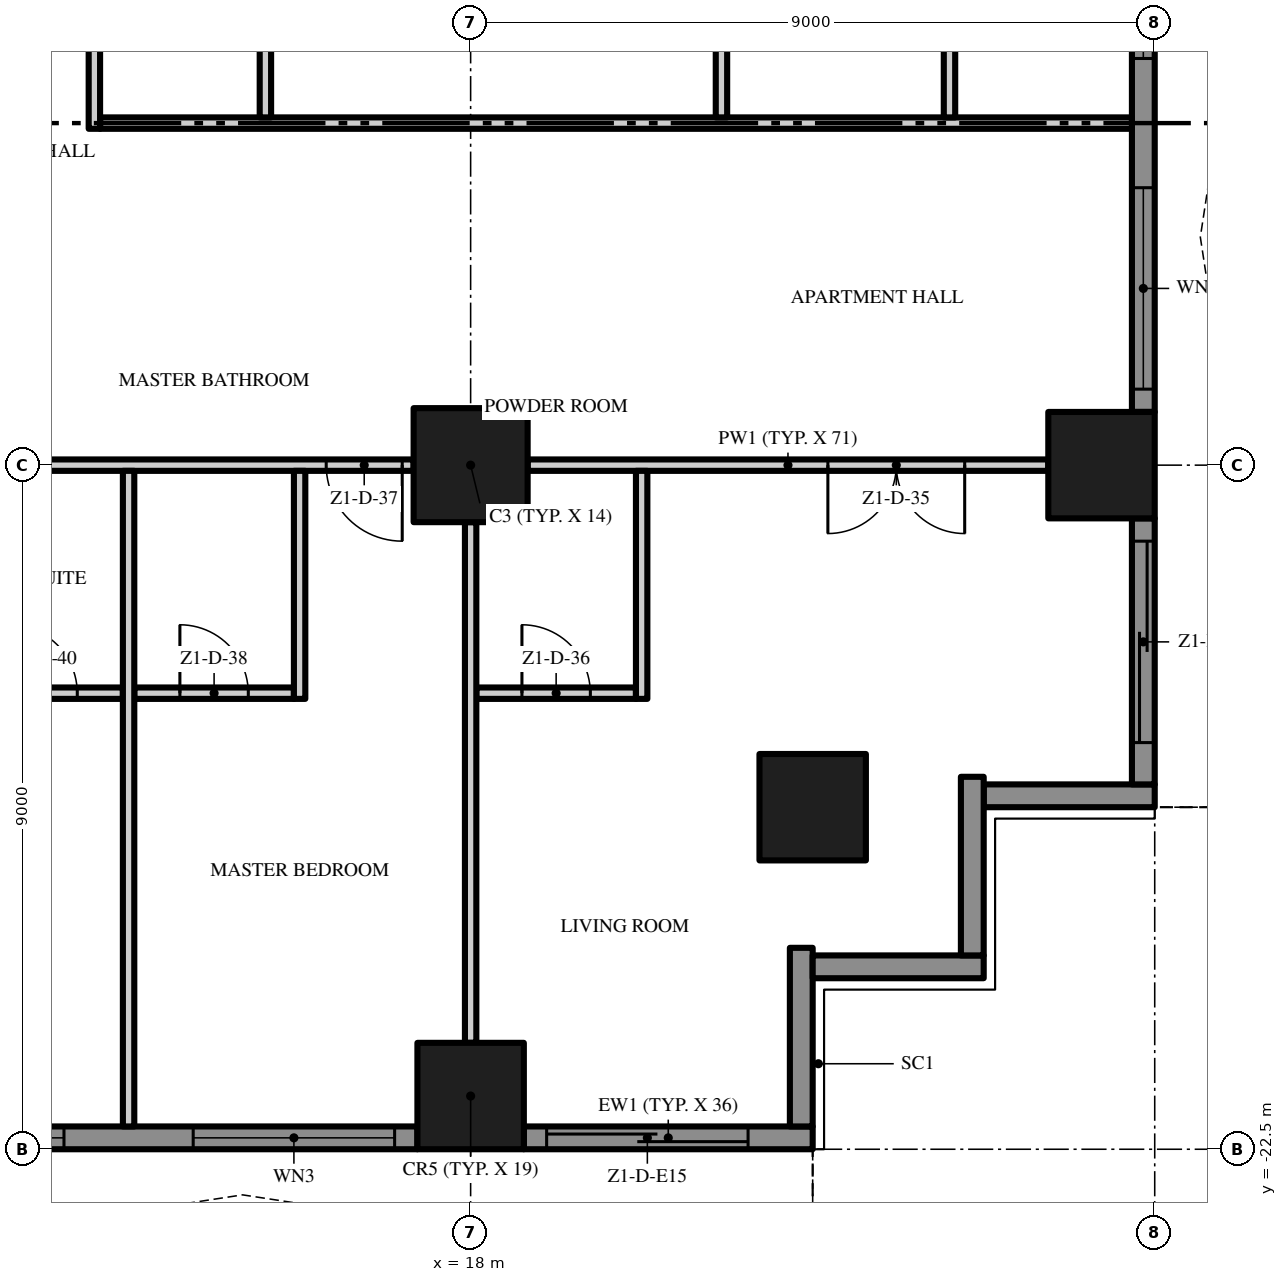
"""IFC4 building model, lengths in metres.
Left out: names, types, materials, properties, quantities, classifications, styles, units other than length and angle.
Written with IfcOpenShell. Run it as: python <this file> out.ifc"""

import sys

from ifc_helpers import new_model, si_unit, direction, frame, frame_2d, origin, origin_2d, place, context, subcontext, project, spatial, polyline, rectangle, outline, extrude, element, fill, save


model = new_model("IFC4")
c1 = context("Model", 3, precision=1e-05, world=origin(), true_north=direction((0.0, 1.0)))
c2 = subcontext(c1, "Body", "Model", "MODEL_VIEW")
j1 = project(units=[si_unit("LENGTHUNIT", "METRE"), si_unit("PLANEANGLEUNIT", "RADIAN")], contexts=[c1])
p1 = place(None, origin())
s1 = spatial("IfcSite", under=j1, at=p1, CompositionType="ELEMENT")
p2 = place(p1, origin())
s2 = spatial("IfcBuilding", under=s1, at=p2, CompositionType="ELEMENT")
p3 = place(p2, frame((0.0, 0.0, 53.0)))
s3 = spatial("IfcBuildingStorey", under=s2, at=p3, CompositionType="ELEMENT", Elevation=53.0)
p4 = place(p3, frame((18.0, -13.5, 0.0), z_axis=(0.0, 0.0, 1.0), x_axis=(1.0, 0.0, 0.0)))
e1 = element("IfcColumn", 1, at=p4, inside=s3, PredefinedType="COLUMN", context=c2, shape_type="SweptSolid", body=[
    extrude(rectangle(XDim=1.5, YDim=1.5, at=origin_2d()), origin(), (0.0, 0.0, 1.0), 3.5),
])
for number, where, z_axis, x_axis in (
    (2, (18.0, -21.8, 0.0), (0.0, 0.0, 1.0), (1.0, 0.0, 0.0)),
    (3, (26.3, -13.5, 0.0), (0.0, 0.0, 1.0), (1.0, 0.0, 0.0)),
    (4, (22.5, -18.0, 0.0), (0.0, 0.0, 1.0), (1.0, 0.0, 0.0)),
):
    element("IfcColumn", number, at=place(p3, frame(where, z_axis=z_axis, x_axis=x_axis)), inside=s3, PredefinedType="COLUMN", context=c2, shape_type="SweptSolid", body=[
        extrude(rectangle(XDim=1.4, YDim=1.4, at=origin_2d()), origin(), (0.0, 0.0, 1.0), 3.5),
    ])
p5 = place(p3, frame((17.3, -22.35, 0.0), z_axis=(0.0, 0.0, 1.0), x_axis=(-1.0, 0.0, 0.0)))
e5 = element("IfcWall", 5, at=p5, inside=s3, PredefinedType="SOLIDWALL", context=c2, shape_type="SweptSolid", body=[
    extrude(rectangle(XDim=7.6, YDim=0.3, at=frame_2d((3.8, 0.0))), origin(), (0.0, 0.0, 1.0), 3.5),
])
p6 = place(p5, frame((4.65, 0.0, 0.45)))
e6 = element("IfcOpeningElement", 6, at=p6, cuts=e5, PredefinedType="OPENING", context=c2, shape_type="SweptSolid", body=[
    extrude(rectangle(XDim=2.65, YDim=2.65, at=frame_2d((1.325, 1.325))), frame((0.0, 0.16, 0.0), z_axis=(0.0, -1.0, 0.0), x_axis=(1.0, 0.0, 0.0)), (0.0, 0.0, 1.0), 0.32),
])
p7 = place(p5, frame((0.3, 0.0, 0.45)))
e7 = element("IfcOpeningElement", 7, at=p7, cuts=e5, PredefinedType="OPENING", context=c2, shape_type="SweptSolid", body=[
    extrude(rectangle(XDim=2.65, YDim=2.65, at=frame_2d((1.325, 1.325))), frame((0.0, 0.16, 0.0), z_axis=(0.0, -1.0, 0.0), x_axis=(1.0, 0.0, 0.0)), (0.0, 0.0, 1.0), 0.32),
])
p8 = place(p3, frame((22.5, -22.35, 0.0), z_axis=(0.0, 0.0, 1.0), x_axis=(-1.0, 0.0, 0.0)))
e8 = element("IfcWall", 8, at=p8, inside=s3, PredefinedType="SOLIDWALL", context=c2, shape_type="SweptSolid", body=[
    extrude(rectangle(XDim=3.8, YDim=0.3, at=frame_2d((1.9, 0.0))), origin(), (0.0, 0.0, 1.0), 3.5),
])
p9 = place(p8, frame((0.85, 0.0, 0.0)))
e9 = element("IfcOpeningElement", 9, at=p9, cuts=e8, PredefinedType="OPENING", context=c2, shape_type="SweptSolid", body=[
    extrude(rectangle(XDim=2.65, YDim=2.4, at=frame_2d((1.325, 1.2))), frame((0.0, 0.16, 0.0), z_axis=(0.0, -1.0, 0.0), x_axis=(1.0, 0.0, 0.0)), (0.0, 0.0, 1.0), 0.32),
])
p10 = place(p3, frame((22.35, -19.85, 0.0), z_axis=(0.0, 0.0, 1.0), x_axis=(0.0, -1.0, 0.0)))
e10 = element("IfcWall", 10, at=p10, inside=s3, PredefinedType="SOLIDWALL", context=c2, shape_type="SweptSolid", body=[
    extrude(rectangle(XDim=2.35, YDim=0.3, at=frame_2d((1.175, 0.0))), origin(), (0.0, 0.0, 1.0), 3.5),
])
p11 = place(p3, frame((24.75, -20.1, 0.0), z_axis=(0.0, 0.0, 1.0), x_axis=(-1.0, 0.0, 0.0)))
e11 = element("IfcWall", 11, at=p11, inside=s3, PredefinedType="SOLIDWALL", context=c2, shape_type="SweptSolid", body=[
    extrude(rectangle(XDim=2.25, YDim=0.3, at=frame_2d((1.125, 0.0))), origin(), (0.0, 0.0, 1.0), 3.5),
])
p12 = place(p3, frame((24.6, -17.6, 0.0), z_axis=(0.0, 0.0, 1.0), x_axis=(0.0, -1.0, 0.0)))
e12 = element("IfcWall", 12, at=p12, inside=s3, PredefinedType="SOLIDWALL", context=c2, shape_type="SweptSolid", body=[
    extrude(rectangle(XDim=2.35, YDim=0.3, at=frame_2d((1.175, 0.0))), origin(), (0.0, 0.0, 1.0), 3.5),
])
p13 = place(p3, frame((27.0, -17.85, 0.0), z_axis=(0.0, 0.0, 1.0), x_axis=(-1.0, 0.0, 0.0)))
e13 = element("IfcWall", 13, at=p13, inside=s3, PredefinedType="SOLIDWALL", context=c2, shape_type="SweptSolid", body=[
    extrude(rectangle(XDim=2.25, YDim=0.3, at=frame_2d((1.125, 0.0))), origin(), (0.0, 0.0, 1.0), 3.5),
])
p14 = place(p3, frame((26.85, -14.2, 0.0), z_axis=(0.0, 0.0, 1.0), x_axis=(0.0, -1.0, 0.0)))
e14 = element("IfcWall", 14, at=p14, inside=s3, PredefinedType="SOLIDWALL", context=c2, shape_type="SweptSolid", body=[
    extrude(rectangle(XDim=3.5, YDim=0.3, at=frame_2d((1.75, 0.0))), origin(), (0.0, 0.0, 1.0), 3.5),
])
p15 = place(p14, frame((0.3, 0.0, 0.0)))
e15 = element("IfcOpeningElement", 15, at=p15, cuts=e14, PredefinedType="OPENING", context=c2, shape_type="SweptSolid", body=[
    extrude(rectangle(XDim=2.65, YDim=2.4, at=frame_2d((1.325, 1.2))), frame((0.0, 0.16, 0.0), z_axis=(0.0, -1.0, 0.0), x_axis=(1.0, 0.0, 0.0)), (0.0, 0.0, 1.0), 0.32),
])
p16 = place(p3, frame((26.85, -5.2, 0.0), z_axis=(0.0, 0.0, 1.0), x_axis=(0.0, -1.0, 0.0)))
e16 = element("IfcWall", 16, at=p16, inside=s3, PredefinedType="SOLIDWALL", context=c2, shape_type="SweptSolid", body=[
    extrude(rectangle(XDim=7.6, YDim=0.3, at=frame_2d((3.8, 0.0))), origin(), (0.0, 0.0, 1.0), 3.5),
])
p17 = place(p16, frame((4.65, 0.0, 0.45)))
e17 = element("IfcOpeningElement", 17, at=p17, cuts=e16, PredefinedType="OPENING", context=c2, shape_type="SweptSolid", body=[
    extrude(rectangle(XDim=2.65, YDim=2.65, at=frame_2d((1.325, 1.325))), frame((0.0, 0.16, 0.0), z_axis=(0.0, -1.0, 0.0), x_axis=(1.0, 0.0, 0.0)), (0.0, 0.0, 1.0), 0.32),
])
p18 = place(p16, frame((0.3, 0.0, 0.45)))
e18 = element("IfcOpeningElement", 18, at=p18, cuts=e16, PredefinedType="OPENING", context=c2, shape_type="SweptSolid", body=[
    extrude(rectangle(XDim=2.65, YDim=2.65, at=frame_2d((1.325, 1.325))), frame((0.0, 0.16, 0.0), z_axis=(0.0, -1.0, 0.0), x_axis=(1.0, 0.0, 0.0)), (0.0, 0.0, 1.0), 0.32),
])
p19 = place(p3, origin())
e19 = element("IfcWall", 19, at=p19, inside=s3, PredefinedType="USERDEFINED", context=c2, shape_type="SweptSolid", body=[
    extrude(outline(polyline([(-22.5, -25.5), (-21.0, -25.271), (-19.5, -24.671), (-18.0, -23.929), (-16.5, -23.329), (-15.0, -23.1), (-13.5, -23.329), (-12.0, -23.929), (-10.5, -24.671), (-9.0, -25.271), (-7.5, -25.5), (-6.0, -25.271), (-4.5, -24.671), (-3.0, -23.929), (-1.5, -23.329), (0.0, -23.1), (1.5, -23.329), (3.0, -23.929), (4.5, -24.671), (6.0, -25.271), (7.5, -25.5), (9.0, -25.271), (10.5, -24.671), (12.0, -23.929), (13.5, -23.329), (15.0, -23.1), (16.5, -23.329), (18.0, -23.929), (19.5, -24.671), (21.0, -25.271), (22.5, -25.5), (22.538, -25.253), (21.066, -25.028), (19.602, -24.442), (18.102, -23.701), (16.566, -23.086), (15.0, -22.847), (13.434, -23.086), (11.898, -23.701), (10.398, -24.442), (8.934, -25.028), (7.5, -25.247), (6.066, -25.028), (4.602, -24.442), (3.102, -23.701), (1.566, -23.086), (0.0, -22.847), (-1.566, -23.086), (-3.102, -23.701), (-4.602, -24.442), (-6.066, -25.028), (-7.5, -25.247), (-8.934, -25.028), (-10.398, -24.442), (-11.898, -23.701), (-13.434, -23.086), (-15.0, -22.847), (-16.566, -23.086), (-18.102, -23.701), (-19.602, -24.442), (-21.066, -25.028), (-22.538, -25.253), (-22.5, -25.5)])), origin(), (0.0, 0.0, 1.0), 0.9),
])
p20 = place(p3, origin())
e20 = element("IfcWall", 20, at=p20, inside=s3, PredefinedType="USERDEFINED", context=c2, shape_type="SweptSolid", body=[
    extrude(outline(polyline([(30.0, -18.0), (29.771, -16.5), (29.171, -15.0), (28.429, -13.5), (27.829, -12.0), (27.6, -10.5), (27.829, -9.0), (28.429, -7.5), (29.171, -6.0), (29.771, -4.5), (30.0, -3.0), (29.771, -1.5), (29.171, 0.0), (28.429, 1.5), (27.829, 3.0), (27.6, 4.5), (27.829, 6.0), (28.429, 7.5), (29.171, 9.0), (29.771, 10.5), (30.0, 12.0), (29.771, 13.5), (29.171, 15.0), (28.429, 16.5), (27.829, 18.0), (27.597, 17.907), (28.201, 16.398), (28.942, 14.898), (29.528, 13.434), (29.747, 12.0), (29.528, 10.566), (28.942, 9.102), (28.201, 7.602), (27.586, 6.066), (27.347, 4.5), (27.586, 2.934), (28.201, 1.398), (28.942, -0.102), (29.528, -1.566), (29.747, -3.0), (29.528, -4.434), (28.942, -5.898), (28.201, -7.398), (27.586, -8.934), (27.347, -10.5), (27.586, -12.066), (28.201, -13.602), (28.942, -15.102), (29.528, -16.566), (29.753, -18.038), (30.0, -18.0)])), origin(), (0.0, 0.0, 1.0), 0.9),
])
p21 = place(p3, frame((11.325, -16.5, 0.0), z_axis=(0.0, 0.0, 1.0), x_axis=(1.0, 0.0, 0.0)))
e21 = element("IfcWall", 21, at=p21, inside=s3, PredefinedType="PARTITIONING", context=c2, shape_type="SweptSolid", body=[
    extrude(rectangle(XDim=2.1, YDim=0.15, at=frame_2d((1.05, 0.0))), origin(), (0.0, 0.0, 1.0), 3.5),
])
p22 = place(p21, frame((0.6, 0.0, 0.0)))
e22 = element("IfcOpeningElement", 22, at=p22, cuts=e21, PredefinedType="OPENING", context=c2, shape_type="SweptSolid", body=[
    extrude(rectangle(XDim=0.9, YDim=2.1, at=frame_2d((0.45, 1.05))), frame((0.0, 0.085, 0.0), z_axis=(0.0, -1.0, 0.0), x_axis=(1.0, 0.0, 0.0)), (0.0, 0.0, 1.0), 0.17),
])
p23 = place(p3, frame((13.575, -16.5, 0.0), z_axis=(0.0, 0.0, 1.0), x_axis=(1.0, 0.0, 0.0)))
e23 = element("IfcWall", 23, at=p23, inside=s3, PredefinedType="PARTITIONING", context=c2, shape_type="SweptSolid", body=[
    extrude(rectangle(XDim=2.1, YDim=0.15, at=frame_2d((1.05, 0.0))), origin(), (0.0, 0.0, 1.0), 3.5),
])
p24 = place(p23, frame((0.6, 0.0, 0.0)))
e24 = element("IfcOpeningElement", 24, at=p24, cuts=e23, PredefinedType="OPENING", context=c2, shape_type="SweptSolid", body=[
    extrude(rectangle(XDim=0.9, YDim=2.1, at=frame_2d((0.45, 1.05))), frame((0.0, 0.085, 0.0), z_axis=(0.0, -1.0, 0.0), x_axis=(1.0, 0.0, 0.0)), (0.0, 0.0, 1.0), 0.17),
])
p25 = place(p3, frame((18.075, -16.5, 0.0), z_axis=(0.0, 0.0, 1.0), x_axis=(1.0, 0.0, 0.0)))
e25 = element("IfcWall", 25, at=p25, inside=s3, PredefinedType="PARTITIONING", context=c2, shape_type="SweptSolid", body=[
    extrude(rectangle(XDim=2.1, YDim=0.15, at=frame_2d((1.05, 0.0))), origin(), (0.0, 0.0, 1.0), 3.5),
])
p26 = place(p25, frame((0.6, 0.0, 0.0)))
e26 = element("IfcOpeningElement", 26, at=p26, cuts=e25, PredefinedType="OPENING", context=c2, shape_type="SweptSolid", body=[
    extrude(rectangle(XDim=0.9, YDim=2.1, at=frame_2d((0.45, 1.05))), frame((0.0, 0.085, 0.0), z_axis=(0.0, -1.0, 0.0), x_axis=(1.0, 0.0, 0.0)), (0.0, 0.0, 1.0), 0.17),
])
p27 = place(p3, frame((17.25, -13.5, 0.0), z_axis=(0.0, 0.0, 1.0), x_axis=(-1.0, 0.0, 0.0)))
e27 = element("IfcWall", 27, at=p27, inside=s3, PredefinedType="PARTITIONING", context=c2, shape_type="SweptSolid", body=[
    extrude(rectangle(XDim=7.5, YDim=0.15, at=frame_2d((3.75, 0.0))), origin(), (0.0, 0.0, 1.0), 3.5),
])
p28 = place(p27, frame((0.15, 0.0, 0.0)))
e28 = element("IfcOpeningElement", 28, at=p28, cuts=e27, PredefinedType="OPENING", context=c2, shape_type="SweptSolid", body=[
    extrude(rectangle(XDim=1.0, YDim=2.4, at=frame_2d((0.5, 1.2))), frame((0.0, 0.085, 0.0), z_axis=(0.0, -1.0, 0.0), x_axis=(1.0, 0.0, 0.0)), (0.0, 0.0, 1.0), 0.17),
])
p29 = place(p27, frame((6.35, 0.0, 0.0)))
e29 = element("IfcOpeningElement", 29, at=p29, cuts=e27, PredefinedType="OPENING", context=c2, shape_type="SweptSolid", body=[
    extrude(rectangle(XDim=1.0, YDim=2.4, at=frame_2d((0.5, 1.2))), frame((0.0, 0.085, 0.0), z_axis=(0.0, -1.0, 0.0), x_axis=(1.0, 0.0, 0.0)), (0.0, 0.0, 1.0), 0.17),
])
p30 = place(p3, frame((25.6, -13.5, 0.0), z_axis=(0.0, 0.0, 1.0), x_axis=(-1.0, 0.0, 0.0)))
e30 = element("IfcWall", 30, at=p30, inside=s3, PredefinedType="PARTITIONING", context=c2, shape_type="SweptSolid", body=[
    extrude(rectangle(XDim=6.85, YDim=0.15, at=frame_2d((3.425, 0.0))), origin(), (0.0, 0.0, 1.0), 3.5),
])
p31 = place(p30, frame((1.1, 0.0, 0.0)))
e31 = element("IfcOpeningElement", 31, at=p31, cuts=e30, PredefinedType="OPENING", context=c2, shape_type="SweptSolid", body=[
    extrude(rectangle(XDim=1.8, YDim=2.4, at=frame_2d((0.9, 1.2))), frame((0.0, 0.085, 0.0), z_axis=(0.0, -1.0, 0.0), x_axis=(1.0, 0.0, 0.0)), (0.0, 0.0, 1.0), 0.17),
])
p32 = place(p3, frame((13.125, -9.0, 0.0), z_axis=(0.0, 0.0, 1.0), x_axis=(1.0, 0.0, 0.0)))
e32 = element("IfcWall", 32, at=p32, inside=s3, PredefinedType="PARTITIONING", context=c2, shape_type="SweptSolid", body=[
    extrude(rectangle(XDim=13.575, YDim=0.15, at=frame_2d((6.787, 0.0))), origin(), (0.0, 0.0, 1.0), 3.5),
])
p33 = place(p3, frame((13.05, -4.425, 0.0), z_axis=(0.0, 0.0, 1.0), x_axis=(0.0, -1.0, 0.0)))
e33 = element("IfcWall", 33, at=p33, inside=s3, PredefinedType="PARTITIONING", context=c2, shape_type="SweptSolid", body=[
    extrude(rectangle(XDim=4.65, YDim=0.15, at=frame_2d((2.325, 0.0))), origin(), (0.0, 0.0, 1.0), 3.5),
])
p34 = place(p33, frame((1.875, 0.0, 0.0)))
e34 = element("IfcOpeningElement", 34, at=p34, cuts=e33, PredefinedType="OPENING", context=c2, shape_type="SweptSolid", body=[
    extrude(rectangle(XDim=0.9, YDim=2.1, at=frame_2d((0.45, 1.05))), frame((0.0, 0.085, 0.0), z_axis=(0.0, -1.0, 0.0), x_axis=(1.0, 0.0, 0.0)), (0.0, 0.0, 1.0), 0.17),
])
p35 = place(p3, frame((13.5, -22.2, 0.0), z_axis=(0.0, 0.0, 1.0), x_axis=(0.0, 1.0, 0.0)))
e35 = element("IfcWall", 35, at=p35, inside=s3, PredefinedType="PARTITIONING", context=c2, shape_type="SweptSolid", body=[
    extrude(rectangle(XDim=8.625, YDim=0.15, at=frame_2d((4.312, 0.0))), origin(), (0.0, 0.0, 1.0), 3.5),
])
p36 = place(p3, frame((15.3, -8.925, 0.0), z_axis=(0.0, 0.0, 1.0), x_axis=(0.0, 1.0, 0.0)))
e36 = element("IfcWall", 36, at=p36, inside=s3, PredefinedType="PARTITIONING", context=c2, shape_type="SweptSolid", body=[
    extrude(rectangle(XDim=4.35, YDim=0.15, at=frame_2d((2.175, 0.0))), origin(), (0.0, 0.0, 1.0), 3.5),
])
p37 = place(p3, frame((15.75, -16.575, 0.0), z_axis=(0.0, 0.0, 1.0), x_axis=(0.0, 1.0, 0.0)))
e37 = element("IfcWall", 37, at=p37, inside=s3, PredefinedType="PARTITIONING", context=c2, shape_type="SweptSolid", body=[
    extrude(rectangle(XDim=3.0, YDim=0.15, at=frame_2d((1.5, 0.0))), origin(), (0.0, 0.0, 1.0), 3.5),
])
p38 = place(p3, frame((18.0, -21.1, 0.0), z_axis=(0.0, 0.0, 1.0), x_axis=(0.0, 1.0, 0.0)))
e38 = element("IfcWall", 38, at=p38, inside=s3, PredefinedType="PARTITIONING", context=c2, shape_type="SweptSolid", body=[
    extrude(rectangle(XDim=6.85, YDim=0.15, at=frame_2d((3.425, 0.0))), origin(), (0.0, 0.0, 1.0), 3.5),
])
p39 = place(p3, frame((20.25, -16.575, 0.0), z_axis=(0.0, 0.0, 1.0), x_axis=(0.0, 1.0, 0.0)))
e39 = element("IfcWall", 39, at=p39, inside=s3, PredefinedType="PARTITIONING", context=c2, shape_type="SweptSolid", body=[
    extrude(rectangle(XDim=3.0, YDim=0.15, at=frame_2d((1.5, 0.0))), origin(), (0.0, 0.0, 1.0), 3.5),
])
for number, where, z_axis, x_axis in (
    (40, (21.3, -8.925, 0.0), (0.0, 0.0, 1.0), (0.0, 1.0, 0.0)),
    (41, (24.3, -8.925, 0.0), (0.0, 0.0, 1.0), (0.0, 1.0, 0.0)),
):
    element("IfcWall", number, at=place(p3, frame(where, z_axis=z_axis, x_axis=x_axis)), inside=s3, PredefinedType="PARTITIONING", context=c2, shape_type="SweptSolid", body=[
        extrude(rectangle(XDim=4.35, YDim=0.15, at=frame_2d((2.175, 0.0))), origin(), (0.0, 0.0, 1.0), 3.5),
    ])
p40 = place(p6, origin())
e42 = element("IfcWindow", 42, at=p40, inside=s3, PartitioningType="SINGLE_PANEL", PredefinedType="WINDOW", context=c2, shape_type="SweptSolid", body=[
    extrude(rectangle(XDim=2.65, YDim=2.65, at=frame_2d((1.325, 1.325))), frame((0.0, 0.03, 0.0), z_axis=(0.0, -1.0, 0.0), x_axis=(1.0, 0.0, 0.0)), (0.0, 0.0, 1.0), 0.06),
])
fill(e6, e42)
p41 = place(p7, origin())
e43 = element("IfcWindow", 43, at=p41, inside=s3, PartitioningType="SINGLE_PANEL", PredefinedType="WINDOW", context=c2, shape_type="SweptSolid", body=[
    extrude(rectangle(XDim=2.65, YDim=2.65, at=frame_2d((1.325, 1.325))), frame((0.0, 0.03, 0.0), z_axis=(0.0, -1.0, 0.0), x_axis=(1.0, 0.0, 0.0)), (0.0, 0.0, 1.0), 0.06),
])
fill(e7, e43)
p42 = place(p9, origin())
e44 = element("IfcDoor", 44, at=p42, inside=s3, OperationType="SINGLE_SWING_LEFT", PredefinedType="DOOR", context=c2, shape_type="SweptSolid", body=[
    extrude(rectangle(XDim=2.65, YDim=2.4, at=frame_2d((1.325, 1.2))), frame((0.0, 0.025, 0.0), z_axis=(0.0, -1.0, 0.0), x_axis=(1.0, 0.0, 0.0)), (0.0, 0.0, 1.0), 0.05),
])
fill(e9, e44)
p43 = place(p15, origin())
e45 = element("IfcDoor", 45, at=p43, inside=s3, OperationType="SINGLE_SWING_LEFT", PredefinedType="DOOR", context=c2, shape_type="SweptSolid", body=[
    extrude(rectangle(XDim=2.65, YDim=2.4, at=frame_2d((1.325, 1.2))), frame((0.0, 0.025, 0.0), z_axis=(0.0, -1.0, 0.0), x_axis=(1.0, 0.0, 0.0)), (0.0, 0.0, 1.0), 0.05),
])
fill(e15, e45)
p44 = place(p17, origin())
e46 = element("IfcWindow", 46, at=p44, inside=s3, PartitioningType="SINGLE_PANEL", PredefinedType="WINDOW", context=c2, shape_type="SweptSolid", body=[
    extrude(rectangle(XDim=2.65, YDim=2.65, at=frame_2d((1.325, 1.325))), frame((0.0, 0.03, 0.0), z_axis=(0.0, -1.0, 0.0), x_axis=(1.0, 0.0, 0.0)), (0.0, 0.0, 1.0), 0.06),
])
fill(e17, e46)
p45 = place(p18, origin())
e47 = element("IfcWindow", 47, at=p45, inside=s3, PartitioningType="SINGLE_PANEL", PredefinedType="WINDOW", context=c2, shape_type="SweptSolid", body=[
    extrude(rectangle(XDim=2.65, YDim=2.65, at=frame_2d((1.325, 1.325))), frame((0.0, 0.03, 0.0), z_axis=(0.0, -1.0, 0.0), x_axis=(1.0, 0.0, 0.0)), (0.0, 0.0, 1.0), 0.06),
])
fill(e18, e47)
p46 = place(p31, origin())
e48 = element("IfcDoor", 48, at=p46, inside=s3, OperationType="DOUBLE_DOOR_SINGLE_SWING", PredefinedType="DOOR", context=c2, shape_type="SweptSolid", body=[
    extrude(rectangle(XDim=1.8, YDim=2.4, at=frame_2d((0.9, 1.2))), frame((0.0, 0.025, 0.0), z_axis=(0.0, -1.0, 0.0), x_axis=(1.0, 0.0, 0.0)), (0.0, 0.0, 1.0), 0.05),
])
fill(e31, e48)
p47 = place(p26, origin())
e49 = element("IfcDoor", 49, at=p47, inside=s3, OperationType="SINGLE_SWING_LEFT", PredefinedType="DOOR", context=c2, shape_type="SweptSolid", body=[
    extrude(rectangle(XDim=0.9, YDim=2.1, at=frame_2d((0.45, 1.05))), frame((0.0, 0.025, 0.0), z_axis=(0.0, -1.0, 0.0), x_axis=(1.0, 0.0, 0.0)), (0.0, 0.0, 1.0), 0.05),
])
fill(e26, e49)
p48 = place(p28, origin())
e50 = element("IfcDoor", 50, at=p48, inside=s3, OperationType="SINGLE_SWING_LEFT", PredefinedType="DOOR", context=c2, shape_type="SweptSolid", body=[
    extrude(rectangle(XDim=1.0, YDim=2.4, at=frame_2d((0.5, 1.2))), frame((0.0, 0.025, 0.0), z_axis=(0.0, -1.0, 0.0), x_axis=(1.0, 0.0, 0.0)), (0.0, 0.0, 1.0), 0.05),
])
fill(e28, e50)
p49 = place(p24, origin())
e51 = element("IfcDoor", 51, at=p49, inside=s3, OperationType="SINGLE_SWING_LEFT", PredefinedType="DOOR", context=c2, shape_type="SweptSolid", body=[
    extrude(rectangle(XDim=0.9, YDim=2.1, at=frame_2d((0.45, 1.05))), frame((0.0, 0.025, 0.0), z_axis=(0.0, -1.0, 0.0), x_axis=(1.0, 0.0, 0.0)), (0.0, 0.0, 1.0), 0.05),
])
fill(e24, e51)
p50 = place(p22, origin())
e52 = element("IfcDoor", 52, at=p50, inside=s3, OperationType="SINGLE_SWING_LEFT", PredefinedType="DOOR", context=c2, shape_type="SweptSolid", body=[
    extrude(rectangle(XDim=0.9, YDim=2.1, at=frame_2d((0.45, 1.05))), frame((0.0, 0.025, 0.0), z_axis=(0.0, -1.0, 0.0), x_axis=(1.0, 0.0, 0.0)), (0.0, 0.0, 1.0), 0.05),
])
fill(e22, e52)
save(model, sys.argv[1])
